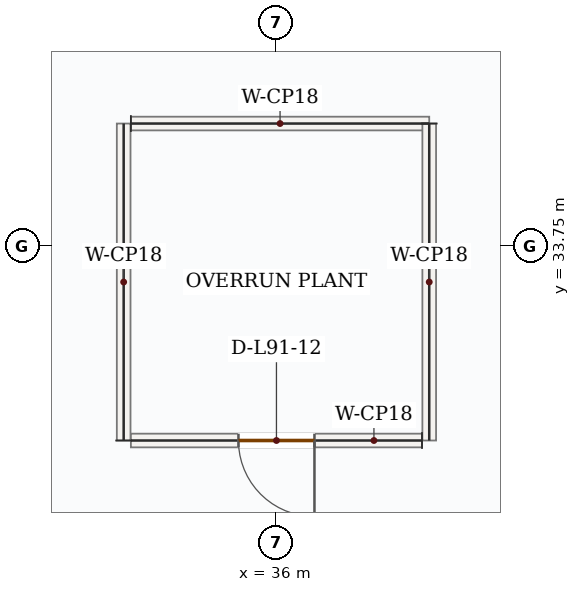
"""IFC4 building model, lengths in metres.
Left out: names, types, materials, properties, quantities, classifications, styles, units other than length and angle.
Written with IfcOpenShell. Run it as: python <this file> out.ifc"""

import sys

from ifc_helpers import new_model, si_unit, direction, frame, frame_2d, origin, place, context, subcontext, project, spatial, rectangle, extrude, source, transform, mapped, element, fill, save


model = new_model("IFC4")
c1 = context("Model", 3, precision=1e-05, world=origin(), true_north=direction((0.0, 1.0)))
c2 = subcontext(c1, "Body", "Model", "MODEL_VIEW")
j1 = project(units=[si_unit("LENGTHUNIT", "METRE"), si_unit("PLANEANGLEUNIT", "RADIAN")], contexts=[c1])
p1 = place(None, origin())
s1 = spatial("IfcSite", under=j1, at=p1, CompositionType="ELEMENT")
p2 = place(p1, origin())
s2 = spatial("IfcBuilding", under=s1, at=p2, CompositionType="ELEMENT")
p3 = place(p2, frame((0.0, 0.0, 375.15)))
s3 = spatial("IfcBuildingStorey", under=s2, at=p3, CompositionType="ELEMENT", Elevation=375.15)
m1 = source(origin(), c2, "Body", "SweptSolid", [
    extrude(rectangle(XDim=4.17, YDim=0.18, at=frame_2d((2.085, 0.0))), origin(), (0.0, 0.0, 1.0), 4.25),
])
p4 = place(p3, frame((33.99, 31.19, 0.0), z_axis=(0.0, 0.0, 1.0), x_axis=(0.0, 1.0, 0.0)))
e1 = element("IfcWall", 1, at=p4, inside=s3, PredefinedType="PARTITIONING", context=c2, shape_type="MappedRepresentation", body=[
    mapped(m1, transform((0.0, 0.0, 0.0), x_axis=(1.0, 0.0, 0.0), y_axis=(0.0, 1.0, 0.0), z_axis=(0.0, 0.0, 1.0), scale=1.0)),
])
m2 = source(origin(), c2, "Body", "SweptSolid", [
    extrude(rectangle(XDim=3.925, YDim=0.18, at=frame_2d((1.962, 0.0))), origin(), (0.0, 0.0, 1.0), 4.25),
])
p5 = place(p3, frame((34.085, 35.36, 0.0), z_axis=(0.0, 0.0, 1.0), x_axis=(1.0, 0.0, 0.0)))
e2 = element("IfcWall", 2, at=p5, inside=s3, PredefinedType="PARTITIONING", context=c2, shape_type="MappedRepresentation", body=[
    mapped(m2, transform((0.0, 0.0, 0.0), x_axis=(1.0, 0.0, 0.0), y_axis=(0.0, 1.0, 0.0), z_axis=(0.0, 0.0, 1.0), scale=1.0)),
])
p6 = place(p3, frame((38.01, 35.36, 0.0), z_axis=(0.0, 0.0, 1.0), x_axis=(0.0, -1.0, 0.0)))
e3 = element("IfcWall", 3, at=p6, inside=s3, PredefinedType="PARTITIONING", context=c2, shape_type="MappedRepresentation", body=[
    mapped(m1, transform((0.0, 0.0, 0.0), x_axis=(1.0, 0.0, 0.0), y_axis=(0.0, 1.0, 0.0), z_axis=(0.0, 0.0, 1.0), scale=1.0)),
])
p7 = place(p3, frame((37.915, 31.19, 0.0), z_axis=(0.0, 0.0, 1.0), x_axis=(-1.0, 0.0, 0.0)))
e4 = element("IfcWall", 4, at=p7, inside=s3, PredefinedType="PARTITIONING", context=c2, shape_type="SweptSolid", body=[
    extrude(rectangle(XDim=3.83, YDim=0.18, at=frame_2d((1.915, 0.0))), origin(), (0.0, 0.0, 1.0), 4.25),
])
p8 = place(p7, frame((1.415, 0.0, 0.0)))
e5 = element("IfcOpeningElement", 5, at=p8, cuts=e4, PredefinedType="OPENING", context=c2, shape_type="SweptSolid", body=[
    extrude(rectangle(XDim=1.0, YDim=2.15, at=frame_2d((0.5, 1.075))), frame((0.0, 0.1, 0.0), z_axis=(0.0, -1.0, 0.0), x_axis=(1.0, 0.0, 0.0)), (0.0, 0.0, 1.0), 0.2),
])
m3 = source(origin(), c2, "Body", "SweptSolid", [
    extrude(rectangle(XDim=1.0, YDim=2.15, at=frame_2d((0.5, 1.075))), frame((0.0, 0.025, 0.0), z_axis=(0.0, -1.0, 0.0), x_axis=(1.0, 0.0, 0.0)), (0.0, 0.0, 1.0), 0.05),
])
p9 = place(p8, origin())
e6 = element("IfcDoor", 6, at=p9, inside=s3, OperationType="SINGLE_SWING_LEFT", PredefinedType="DOOR", context=c2, shape_type="MappedRepresentation", body=[
    mapped(m3, transform((0.0, 0.0, 0.0), x_axis=(1.0, 0.0, 0.0), y_axis=(0.0, 1.0, 0.0), z_axis=(0.0, 0.0, 1.0), scale=1.0)),
])
fill(e5, e6)
save(model, sys.argv[1])
